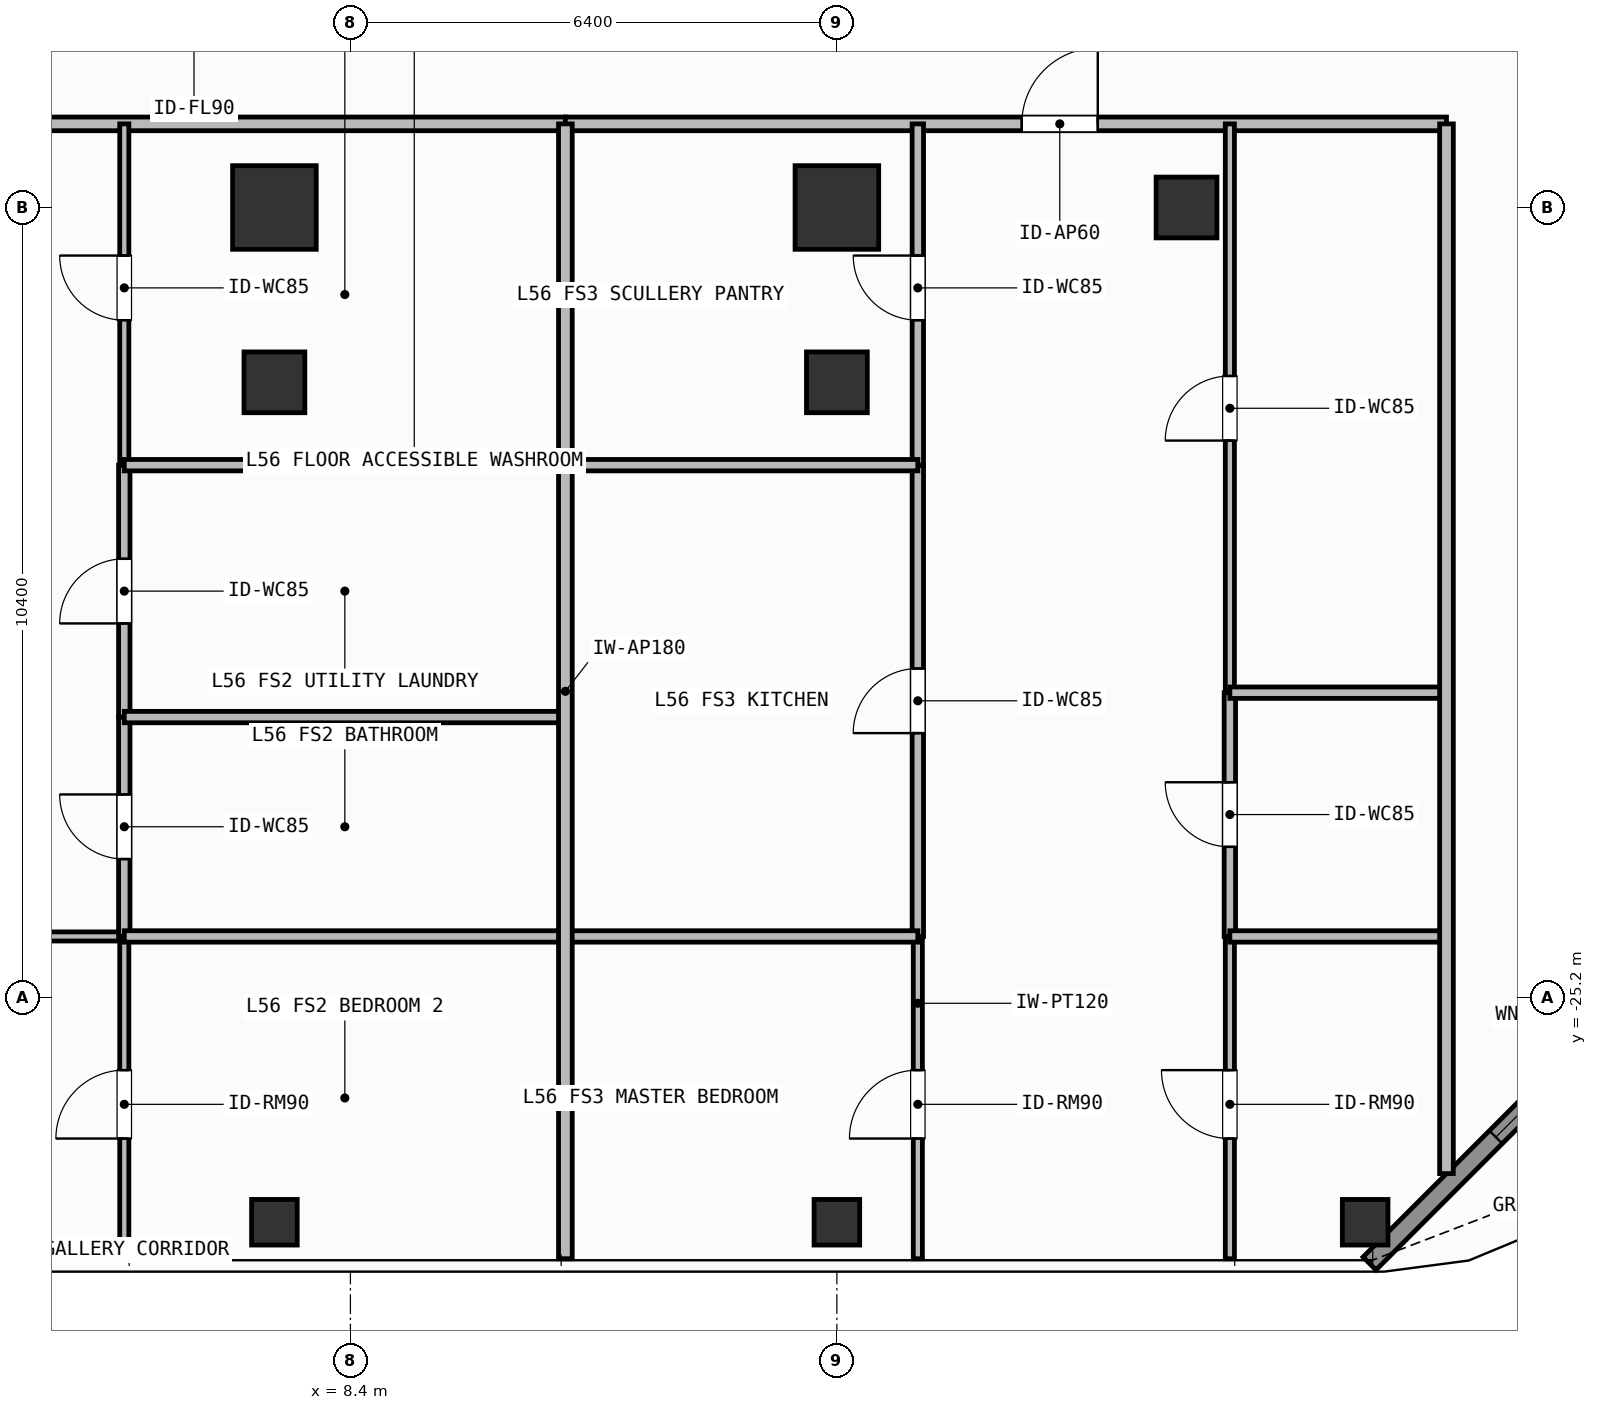
"""IFC4 building model, lengths in metres.
Left out: names, types, materials, properties, quantities, classifications, styles, units other than length and angle.
Written with IfcOpenShell. Run it as: python <this file> out.ifc"""

import sys

from ifc_helpers import new_model, si_unit, direction, frame, frame_2d, origin, origin_2d, place, context, subcontext, project, spatial, rectangle, hollow_rectangle, extrude, element, fill, save


model = new_model("IFC4")
c1 = context("Model", 3, precision=1e-05, world=origin(), true_north=direction((0.0, 1.0)))
c2 = subcontext(c1, "Body", "Model", "MODEL_VIEW")
j1 = project(units=[si_unit("LENGTHUNIT", "METRE"), si_unit("PLANEANGLEUNIT", "RADIAN")], contexts=[c1])
p1 = place(None, origin())
s1 = spatial("IfcSite", under=j1, at=p1, CompositionType="ELEMENT")
p2 = place(p1, origin())
s2 = spatial("IfcBuilding", under=s1, at=p2, CompositionType="ELEMENT")
p3 = place(p2, frame((0.0, 0.0, 227.4)))
s3 = spatial("IfcBuildingStorey", under=s2, at=p3, CompositionType="ELEMENT", Elevation=227.4)
for number, where, z_axis, x_axis in (
    (1, (7.4, -14.8, 0.0), (0.0, 0.0, 1.0), (1.0, 0.0, 0.0)),
    (2, (14.8, -14.8, 0.0), (0.0, 0.0, 1.0), (1.0, 0.0, 0.0)),
):
    element("IfcColumn", number, at=place(p3, frame(where, z_axis=z_axis, x_axis=x_axis)), inside=s3, PredefinedType="COLUMN", context=c2, shape_type="SweptSolid", body=[
        extrude(rectangle(XDim=1.1, YDim=1.1, at=origin_2d()), origin(), (0.0, 0.0, 1.0), 3.9),
    ])
for number, where, z_axis, x_axis in (
    (3, (19.4, -14.8, 0.0), (0.0, 0.0, 1.0), (1.0, 0.0, 0.0)),
    (4, (7.4, -17.1, 0.0), (0.0, 0.0, 1.0), (1.0, 0.0, 0.0)),
    (5, (14.8, -17.1, 0.0), (0.0, 0.0, 1.0), (1.0, 0.0, 0.0)),
):
    element("IfcColumn", number, at=place(p3, frame(where, z_axis=z_axis, x_axis=x_axis)), inside=s3, PredefinedType="COLUMN", context=c2, shape_type="SweptSolid", body=[
        extrude(hollow_rectangle(XDim=0.8, YDim=0.8, WallThickness=0.036, at=origin_2d()), origin(), (0.0, 0.0, 1.0), 3.9),
    ])
for number, where, z_axis, x_axis in (
    (6, (21.75, -28.15, 0.0), (0.0, 0.0, 1.0), (1.0, 0.0, 0.0)),
    (7, (7.4, -28.15, 0.0), (0.0, 0.0, 1.0), (1.0, 0.0, 0.0)),
    (8, (14.8, -28.15, 0.0), (0.0, 0.0, 1.0), (1.0, 0.0, 0.0)),
):
    element("IfcColumn", number, at=place(p3, frame(where, z_axis=z_axis, x_axis=x_axis)), inside=s3, PredefinedType="COLUMN", context=c2, shape_type="SweptSolid", body=[
        extrude(hollow_rectangle(XDim=0.6, YDim=0.6, WallThickness=0.028, at=origin_2d()), origin(), (0.0, 0.0, 1.0), 3.9),
    ])
p4 = place(p3, frame((26.192, -24.308, 0.0), z_axis=(0.0, 0.0, 1.0), x_axis=(-0.707106781187, -0.707106781187, 0.0)))
e9 = element("IfcWall", 9, at=p4, inside=s3, PredefinedType="SOLIDWALL", context=c2, shape_type="SweptSolid", body=[
    extrude(rectangle(XDim=6.201, YDim=0.24, at=frame_2d((3.101, 0.0))), origin(), (0.0, 0.0, 1.0), 3.68),
])
p5 = place(p4, frame((2.351, 0.0, 0.8)))
e10 = element("IfcOpeningElement", 10, at=p5, cuts=e9, PredefinedType="OPENING", context=c2, shape_type="SweptSolid", body=[
    extrude(rectangle(XDim=1.5, YDim=1.85, at=frame_2d((0.75, 0.925))), frame((0.0, 0.13, 0.0), z_axis=(0.0, -1.0, 0.0), x_axis=(1.0, 0.0, 0.0)), (0.0, 0.0, 1.0), 0.26),
])
p6 = place(p3, frame((-4.677, -13.7, 0.0), z_axis=(0.0, 0.0, 1.0), x_axis=(1.0, 0.0, 0.0)))
e11 = element("IfcWall", 11, at=p6, inside=s3, PredefinedType="PARTITIONING", context=c2, shape_type="SweptSolid", body=[
    extrude(rectangle(XDim=15.905, YDim=0.18, at=frame_2d((7.953, 0.0))), origin(), (0.0, 0.0, 1.0), 3.68),
])
p7 = place(p6, frame((6.03, 0.0, 0.0)))
e12 = element("IfcOpeningElement", 12, at=p7, cuts=e11, PredefinedType="OPENING", context=c2, shape_type="SweptSolid", body=[
    extrude(rectangle(XDim=1.0, YDim=2.2, at=frame_2d((0.5, 1.1))), frame((0.0, 0.1, 0.0), z_axis=(0.0, -1.0, 0.0), x_axis=(1.0, 0.0, 0.0)), (0.0, 0.0, 1.0), 0.2),
])
p8 = place(p3, frame((-1.827, -24.39, 0.0), z_axis=(0.0, 0.0, 1.0), x_axis=(1.0, 0.0, 0.0)))
e13 = element("IfcWall", 13, at=p8, inside=s3, PredefinedType="PARTITIONING", context=c2, shape_type="SweptSolid", body=[
    extrude(rectangle(XDim=7.252, YDim=0.12, at=frame_2d((3.626, 0.0))), origin(), (0.0, 0.0, 1.0), 3.68),
])
p9 = place(p8, frame((3.176, 0.0, 0.0)))
e14 = element("IfcOpeningElement", 14, at=p9, cuts=e13, PredefinedType="OPENING", context=c2, shape_type="SweptSolid", body=[
    extrude(rectangle(XDim=0.9, YDim=2.1, at=frame_2d((0.45, 1.05))), frame((0.0, 0.07, 0.0), z_axis=(0.0, -1.0, 0.0), x_axis=(1.0, 0.0, 0.0)), (0.0, 0.0, 1.0), 0.14),
])
p10 = place(p3, frame((5.425, -24.39, 0.0), z_axis=(0.0, 0.0, 1.0), x_axis=(0.0, 1.0, 0.0)))
e15 = element("IfcWall", 15, at=p10, inside=s3, PredefinedType="PARTITIONING", context=c2, shape_type="SweptSolid", body=[
    extrude(rectangle(XDim=2.886, YDim=0.15, at=frame_2d((1.443, 0.0))), origin(), (0.0, 0.0, 1.0), 3.68),
])
p11 = place(p10, frame((1.018, 0.0, 0.0)))
e16 = element("IfcOpeningElement", 16, at=p11, cuts=e15, PredefinedType="OPENING", context=c2, shape_type="SweptSolid", body=[
    extrude(rectangle(XDim=0.85, YDim=2.1, at=frame_2d((0.425, 1.05))), frame((0.0, 0.085, 0.0), z_axis=(0.0, -1.0, 0.0), x_axis=(1.0, 0.0, 0.0)), (0.0, 0.0, 1.0), 0.17),
])
p12 = place(p3, frame((5.425, -21.504, 0.0), z_axis=(0.0, 0.0, 1.0), x_axis=(0.0, 1.0, 0.0)))
e17 = element("IfcWall", 17, at=p12, inside=s3, PredefinedType="PARTITIONING", context=c2, shape_type="SweptSolid", body=[
    extrude(rectangle(XDim=3.314, YDim=0.15, at=frame_2d((1.657, 0.0))), origin(), (0.0, 0.0, 1.0), 3.68),
])
p13 = place(p12, frame((1.232, 0.0, 0.0)))
e18 = element("IfcOpeningElement", 18, at=p13, cuts=e17, PredefinedType="OPENING", context=c2, shape_type="SweptSolid", body=[
    extrude(rectangle(XDim=0.85, YDim=2.1, at=frame_2d((0.425, 1.05))), frame((0.0, 0.085, 0.0), z_axis=(0.0, -1.0, 0.0), x_axis=(1.0, 0.0, 0.0)), (0.0, 0.0, 1.0), 0.17),
])
p14 = place(p3, frame((5.425, -18.19, 0.0), z_axis=(0.0, 0.0, 1.0), x_axis=(0.0, 1.0, 0.0)))
e19 = element("IfcWall", 19, at=p14, inside=s3, PredefinedType="PARTITIONING", context=c2, shape_type="SweptSolid", body=[
    extrude(rectangle(XDim=4.49, YDim=0.12, at=frame_2d((2.245, 0.0))), origin(), (0.0, 0.0, 1.0), 3.68),
])
p15 = place(p14, frame((1.907, 0.0, 0.0)))
e20 = element("IfcOpeningElement", 20, at=p15, cuts=e19, PredefinedType="OPENING", context=c2, shape_type="SweptSolid", body=[
    extrude(rectangle(XDim=0.85, YDim=2.1, at=frame_2d((0.425, 1.05))), frame((0.0, 0.07, 0.0), z_axis=(0.0, -1.0, 0.0), x_axis=(1.0, 0.0, 0.0)), (0.0, 0.0, 1.0), 0.14),
])
p16 = place(p3, frame((5.425, -28.63, 0.0), z_axis=(0.0, 0.0, 1.0), x_axis=(0.0, 1.0, 0.0)))
e21 = element("IfcWall", 21, at=p16, inside=s3, PredefinedType="PARTITIONING", context=c2, shape_type="SweptSolid", body=[
    extrude(rectangle(XDim=4.24, YDim=0.12, at=frame_2d((2.12, 0.0))), origin(), (0.0, 0.0, 1.0), 3.68),
])
p17 = place(p16, frame((1.581, 0.0, 0.0)))
e22 = element("IfcOpeningElement", 22, at=p17, cuts=e21, PredefinedType="OPENING", context=c2, shape_type="SweptSolid", body=[
    extrude(rectangle(XDim=0.9, YDim=2.1, at=frame_2d((0.45, 1.05))), frame((0.0, 0.07, 0.0), z_axis=(0.0, -1.0, 0.0), x_axis=(1.0, 0.0, 0.0)), (0.0, 0.0, 1.0), 0.14),
])
p18 = place(p3, frame((11.228, -13.7, 0.0), z_axis=(0.0, 0.0, 1.0), x_axis=(1.0, 0.0, 0.0)))
e23 = element("IfcWall", 23, at=p18, inside=s3, PredefinedType="PARTITIONING", context=c2, shape_type="SweptSolid", body=[
    extrude(rectangle(XDim=11.592, YDim=0.18, at=frame_2d((5.796, 0.0))), origin(), (0.0, 0.0, 1.0), 3.68),
])
p19 = place(p18, frame((6.004, 0.0, 0.0)))
e24 = element("IfcOpeningElement", 24, at=p19, cuts=e23, PredefinedType="OPENING", context=c2, shape_type="SweptSolid", body=[
    extrude(rectangle(XDim=1.0, YDim=2.2, at=frame_2d((0.5, 1.1))), frame((0.0, 0.1, 0.0), z_axis=(0.0, -1.0, 0.0), x_axis=(1.0, 0.0, 0.0)), (0.0, 0.0, 1.0), 0.2),
])
p20 = place(p3, frame((15.865, -24.39, 0.0), z_axis=(0.0, 0.0, 1.0), x_axis=(0.0, 1.0, 0.0)))
e25 = element("IfcWall", 25, at=p20, inside=s3, PredefinedType="PARTITIONING", context=c2, shape_type="SweptSolid", body=[
    extrude(rectangle(XDim=6.2, YDim=0.15, at=frame_2d((3.1, 0.0))), origin(), (0.0, 0.0, 1.0), 3.68),
])
p21 = place(p20, frame((2.675, 0.0, 0.0)))
e26 = element("IfcOpeningElement", 26, at=p21, cuts=e25, PredefinedType="OPENING", context=c2, shape_type="SweptSolid", body=[
    extrude(rectangle(XDim=0.85, YDim=2.1, at=frame_2d((0.425, 1.05))), frame((0.0, 0.085, 0.0), z_axis=(0.0, -1.0, 0.0), x_axis=(1.0, 0.0, 0.0)), (0.0, 0.0, 1.0), 0.17),
])
p22 = place(p3, frame((15.865, -18.19, 0.0), z_axis=(0.0, 0.0, 1.0), x_axis=(0.0, 1.0, 0.0)))
e27 = element("IfcWall", 27, at=p22, inside=s3, PredefinedType="PARTITIONING", context=c2, shape_type="SweptSolid", body=[
    extrude(rectangle(XDim=4.49, YDim=0.15, at=frame_2d((2.245, 0.0))), origin(), (0.0, 0.0, 1.0), 3.68),
])
p23 = place(p22, frame((1.907, 0.0, 0.0)))
e28 = element("IfcOpeningElement", 28, at=p23, cuts=e27, PredefinedType="OPENING", context=c2, shape_type="SweptSolid", body=[
    extrude(rectangle(XDim=0.85, YDim=2.1, at=frame_2d((0.425, 1.05))), frame((0.0, 0.085, 0.0), z_axis=(0.0, -1.0, 0.0), x_axis=(1.0, 0.0, 0.0)), (0.0, 0.0, 1.0), 0.17),
])
p24 = place(p3, frame((15.865, -28.63, 0.0), z_axis=(0.0, 0.0, 1.0), x_axis=(0.0, 1.0, 0.0)))
e29 = element("IfcWall", 29, at=p24, inside=s3, PredefinedType="PARTITIONING", context=c2, shape_type="SweptSolid", body=[
    extrude(rectangle(XDim=4.24, YDim=0.12, at=frame_2d((2.12, 0.0))), origin(), (0.0, 0.0, 1.0), 3.68),
])
p25 = place(p24, frame((1.581, 0.0, 0.0)))
e30 = element("IfcOpeningElement", 30, at=p25, cuts=e29, PredefinedType="OPENING", context=c2, shape_type="SweptSolid", body=[
    extrude(rectangle(XDim=0.9, YDim=2.1, at=frame_2d((0.45, 1.05))), frame((0.0, 0.07, 0.0), z_axis=(0.0, -1.0, 0.0), x_axis=(1.0, 0.0, 0.0)), (0.0, 0.0, 1.0), 0.14),
])
p26 = place(p3, frame((19.97, -24.39, 0.0), z_axis=(0.0, 0.0, 1.0), x_axis=(0.0, 1.0, 0.0)))
e31 = element("IfcWall", 31, at=p26, inside=s3, PredefinedType="PARTITIONING", context=c2, shape_type="SweptSolid", body=[
    extrude(rectangle(XDim=3.207, YDim=0.15, at=frame_2d((1.604, 0.0))), origin(), (0.0, 0.0, 1.0), 3.68),
])
p27 = place(p26, frame((1.178, 0.0, 0.0)))
e32 = element("IfcOpeningElement", 32, at=p27, cuts=e31, PredefinedType="OPENING", context=c2, shape_type="SweptSolid", body=[
    extrude(rectangle(XDim=0.85, YDim=2.1, at=frame_2d((0.425, 1.05))), frame((0.0, 0.085, 0.0), z_axis=(0.0, -1.0, 0.0), x_axis=(1.0, 0.0, 0.0)), (0.0, 0.0, 1.0), 0.17),
])
p28 = place(p3, frame((19.97, -21.183, 0.0), z_axis=(0.0, 0.0, 1.0), x_axis=(0.0, 1.0, 0.0)))
e33 = element("IfcWall", 33, at=p28, inside=s3, PredefinedType="PARTITIONING", context=c2, shape_type="SweptSolid", body=[
    extrude(rectangle(XDim=7.483, YDim=0.12, at=frame_2d((3.742, 0.0))), origin(), (0.0, 0.0, 1.0), 3.68),
])
p29 = place(p28, frame((3.316, 0.0, 0.0)))
e34 = element("IfcOpeningElement", 34, at=p29, cuts=e33, PredefinedType="OPENING", context=c2, shape_type="SweptSolid", body=[
    extrude(rectangle(XDim=0.85, YDim=2.1, at=frame_2d((0.425, 1.05))), frame((0.0, 0.07, 0.0), z_axis=(0.0, -1.0, 0.0), x_axis=(1.0, 0.0, 0.0)), (0.0, 0.0, 1.0), 0.14),
])
p30 = place(p3, frame((19.97, -28.63, 0.0), z_axis=(0.0, 0.0, 1.0), x_axis=(0.0, 1.0, 0.0)))
e35 = element("IfcWall", 35, at=p30, inside=s3, PredefinedType="PARTITIONING", context=c2, shape_type="SweptSolid", body=[
    extrude(rectangle(XDim=4.24, YDim=0.12, at=frame_2d((2.12, 0.0))), origin(), (0.0, 0.0, 1.0), 3.68),
])
p31 = place(p30, frame((1.581, 0.0, 0.0)))
e36 = element("IfcOpeningElement", 36, at=p31, cuts=e35, PredefinedType="OPENING", context=c2, shape_type="SweptSolid", body=[
    extrude(rectangle(XDim=0.9, YDim=2.1, at=frame_2d((0.45, 1.05))), frame((0.0, 0.07, 0.0), z_axis=(0.0, -1.0, 0.0), x_axis=(1.0, 0.0, 0.0)), (0.0, 0.0, 1.0), 0.14),
])
for number, where, z_axis, x_axis in (
    (37, (5.425, -21.504, 0.0), (0.0, 0.0, 1.0), (1.0, 0.0, 0.0)),
    (38, (5.425, -18.19, 0.0), (0.0, 0.0, 1.0), (1.0, 0.0, 0.0)),
    (39, (5.425, -24.39, 0.0), (0.0, 0.0, 1.0), (1.0, 0.0, 0.0)),
):
    element("IfcWall", number, at=place(p3, frame(where, z_axis=z_axis, x_axis=x_axis)), inside=s3, PredefinedType="PARTITIONING", context=c2, shape_type="SweptSolid", body=[
        extrude(rectangle(XDim=5.803, YDim=0.15, at=frame_2d((2.901, 0.0))), origin(), (0.0, 0.0, 1.0), 3.68),
    ])
for number, where, z_axis, x_axis in (
    (40, (11.228, -18.19, 0.0), (0.0, 0.0, 1.0), (1.0, 0.0, 0.0)),
    (41, (11.228, -24.39, 0.0), (0.0, 0.0, 1.0), (1.0, 0.0, 0.0)),
):
    element("IfcWall", number, at=place(p3, frame(where, z_axis=z_axis, x_axis=x_axis)), inside=s3, PredefinedType="PARTITIONING", context=c2, shape_type="SweptSolid", body=[
        extrude(rectangle(XDim=4.637, YDim=0.15, at=frame_2d((2.318, 0.0))), origin(), (0.0, 0.0, 1.0), 3.68),
    ])
for number, where, z_axis, x_axis in (
    (42, (19.97, -21.183, 0.0), (0.0, 0.0, 1.0), (1.0, 0.0, 0.0)),
    (43, (19.97, -24.39, 0.0), (0.0, 0.0, 1.0), (1.0, 0.0, 0.0)),
):
    element("IfcWall", number, at=place(p3, frame(where, z_axis=z_axis, x_axis=x_axis)), inside=s3, PredefinedType="PARTITIONING", context=c2, shape_type="SweptSolid", body=[
        extrude(rectangle(XDim=2.85, YDim=0.15, at=frame_2d((1.425, 0.0))), origin(), (0.0, 0.0, 1.0), 3.68),
    ])
p32 = place(p3, frame((11.228, -28.63, 0.0), z_axis=(0.0, 0.0, 1.0), x_axis=(0.0, 1.0, 0.0)))
e44 = element("IfcWall", 44, at=p32, inside=s3, PredefinedType="PARTITIONING", context=c2, shape_type="SweptSolid", body=[
    extrude(rectangle(XDim=14.93, YDim=0.18, at=frame_2d((7.465, 0.0))), origin(), (0.0, 0.0, 1.0), 3.42),
])
p33 = place(p3, frame((22.82, -27.51, 0.0), z_axis=(0.0, 0.0, 1.0), x_axis=(0.0, 1.0, 0.0)))
e45 = element("IfcWall", 45, at=p33, inside=s3, PredefinedType="PARTITIONING", context=c2, shape_type="SweptSolid", body=[
    extrude(rectangle(XDim=13.81, YDim=0.18, at=frame_2d((6.905, 0.0))), origin(), (0.0, 0.0, 1.0), 3.68),
])
p34 = place(p5, origin())
e46 = element("IfcWindow", 46, at=p34, inside=s3, PartitioningType="SINGLE_PANEL", PredefinedType="WINDOW", context=c2, shape_type="SweptSolid", body=[
    extrude(rectangle(XDim=1.5, YDim=1.85, at=frame_2d((0.75, 0.925))), frame((0.0, 0.03, 0.0), z_axis=(0.0, -1.0, 0.0), x_axis=(1.0, 0.0, 0.0)), (0.0, 0.0, 1.0), 0.06),
])
fill(e10, e46)
p35 = place(p11, origin())
e47 = element("IfcDoor", 47, at=p35, inside=s3, OperationType="SINGLE_SWING_RIGHT", PredefinedType="DOOR", context=c2, shape_type="SweptSolid", body=[
    extrude(rectangle(XDim=0.85, YDim=2.1, at=frame_2d((0.425, 1.05))), frame((0.0, 0.025, 0.0), z_axis=(0.0, -1.0, 0.0), x_axis=(1.0, 0.0, 0.0)), (0.0, 0.0, 1.0), 0.05),
])
fill(e16, e47)
p36 = place(p13, origin())
e48 = element("IfcDoor", 48, at=p36, inside=s3, OperationType="SINGLE_SWING_LEFT", PredefinedType="DOOR", context=c2, shape_type="SweptSolid", body=[
    extrude(rectangle(XDim=0.85, YDim=2.1, at=frame_2d((0.425, 1.05))), frame((0.0, 0.025, 0.0), z_axis=(0.0, -1.0, 0.0), x_axis=(1.0, 0.0, 0.0)), (0.0, 0.0, 1.0), 0.05),
])
fill(e18, e48)
p37 = place(p15, origin())
e49 = element("IfcDoor", 49, at=p37, inside=s3, OperationType="SINGLE_SWING_RIGHT", PredefinedType="DOOR", context=c2, shape_type="SweptSolid", body=[
    extrude(rectangle(XDim=0.85, YDim=2.1, at=frame_2d((0.425, 1.05))), frame((0.0, 0.025, 0.0), z_axis=(0.0, -1.0, 0.0), x_axis=(1.0, 0.0, 0.0)), (0.0, 0.0, 1.0), 0.05),
])
fill(e20, e49)
p38 = place(p17, origin())
e50 = element("IfcDoor", 50, at=p38, inside=s3, OperationType="SINGLE_SWING_LEFT", PredefinedType="DOOR", context=c2, shape_type="SweptSolid", body=[
    extrude(rectangle(XDim=0.9, YDim=2.1, at=frame_2d((0.45, 1.05))), frame((0.0, 0.025, 0.0), z_axis=(0.0, -1.0, 0.0), x_axis=(1.0, 0.0, 0.0)), (0.0, 0.0, 1.0), 0.05),
])
fill(e22, e50)
p39 = place(p19, origin())
e51 = element("IfcDoor", 51, at=p39, inside=s3, OperationType="SINGLE_SWING_RIGHT", PredefinedType="DOOR", context=c2, shape_type="SweptSolid", body=[
    extrude(rectangle(XDim=1.0, YDim=2.2, at=frame_2d((0.5, 1.1))), frame((0.0, 0.025, 0.0), z_axis=(0.0, -1.0, 0.0), x_axis=(1.0, 0.0, 0.0)), (0.0, 0.0, 1.0), 0.05),
])
fill(e24, e51)
p40 = place(p21, origin())
e52 = element("IfcDoor", 52, at=p40, inside=s3, OperationType="SINGLE_SWING_LEFT", PredefinedType="DOOR", context=c2, shape_type="SweptSolid", body=[
    extrude(rectangle(XDim=0.85, YDim=2.1, at=frame_2d((0.425, 1.05))), frame((0.0, 0.025, 0.0), z_axis=(0.0, -1.0, 0.0), x_axis=(1.0, 0.0, 0.0)), (0.0, 0.0, 1.0), 0.05),
])
fill(e26, e52)
p41 = place(p23, origin())
e53 = element("IfcDoor", 53, at=p41, inside=s3, OperationType="SINGLE_SWING_RIGHT", PredefinedType="DOOR", context=c2, shape_type="SweptSolid", body=[
    extrude(rectangle(XDim=0.85, YDim=2.1, at=frame_2d((0.425, 1.05))), frame((0.0, 0.025, 0.0), z_axis=(0.0, -1.0, 0.0), x_axis=(1.0, 0.0, 0.0)), (0.0, 0.0, 1.0), 0.05),
])
fill(e28, e53)
p42 = place(p25, origin())
e54 = element("IfcDoor", 54, at=p42, inside=s3, OperationType="SINGLE_SWING_LEFT", PredefinedType="DOOR", context=c2, shape_type="SweptSolid", body=[
    extrude(rectangle(XDim=0.9, YDim=2.1, at=frame_2d((0.45, 1.05))), frame((0.0, 0.025, 0.0), z_axis=(0.0, -1.0, 0.0), x_axis=(1.0, 0.0, 0.0)), (0.0, 0.0, 1.0), 0.05),
])
fill(e30, e54)
p43 = place(p27, origin())
e55 = element("IfcDoor", 55, at=p43, inside=s3, OperationType="SINGLE_SWING_RIGHT", PredefinedType="DOOR", context=c2, shape_type="SweptSolid", body=[
    extrude(rectangle(XDim=0.85, YDim=2.1, at=frame_2d((0.425, 1.05))), frame((0.0, 0.025, 0.0), z_axis=(0.0, -1.0, 0.0), x_axis=(1.0, 0.0, 0.0)), (0.0, 0.0, 1.0), 0.05),
])
fill(e32, e55)
p44 = place(p29, origin())
e56 = element("IfcDoor", 56, at=p44, inside=s3, OperationType="SINGLE_SWING_LEFT", PredefinedType="DOOR", context=c2, shape_type="SweptSolid", body=[
    extrude(rectangle(XDim=0.85, YDim=2.1, at=frame_2d((0.425, 1.05))), frame((0.0, 0.025, 0.0), z_axis=(0.0, -1.0, 0.0), x_axis=(1.0, 0.0, 0.0)), (0.0, 0.0, 1.0), 0.05),
])
fill(e34, e56)
p45 = place(p31, origin())
e57 = element("IfcDoor", 57, at=p45, inside=s3, OperationType="SINGLE_SWING_RIGHT", PredefinedType="DOOR", context=c2, shape_type="SweptSolid", body=[
    extrude(rectangle(XDim=0.9, YDim=2.1, at=frame_2d((0.45, 1.05))), frame((0.0, 0.025, 0.0), z_axis=(0.0, -1.0, 0.0), x_axis=(1.0, 0.0, 0.0)), (0.0, 0.0, 1.0), 0.05),
])
fill(e36, e57)
save(model, sys.argv[1])
